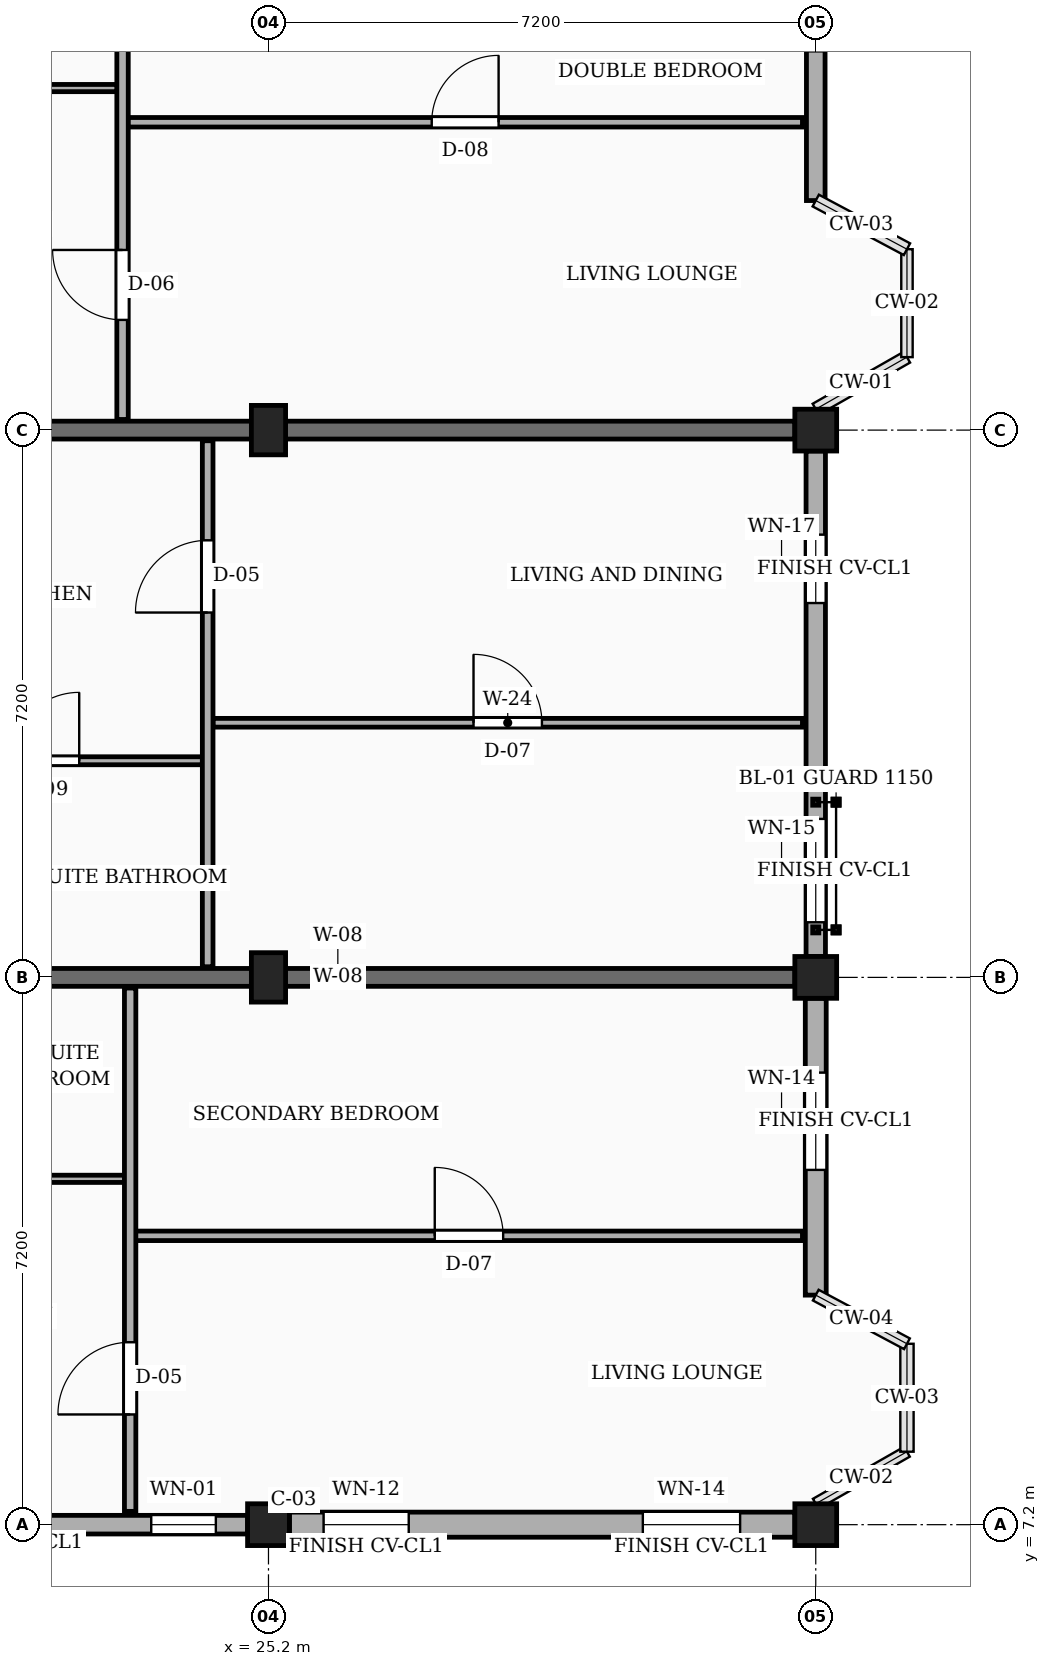
"""IFC4 building model, lengths in metres.
Left out: names, types, materials, properties, quantities, classifications, styles, units other than length and angle.
Written with IfcOpenShell. Run it as: python <this file> out.ifc"""

import sys

from ifc_helpers import new_model, si_unit, direction, frame, frame_2d, origin, origin_2d, place, context, subcontext, project, spatial, rectangle, extrude, element, fill, save


model = new_model("IFC4")
c1 = context("Model", 3, precision=1e-05, world=origin(), true_north=direction((0.0, 1.0)))
c2 = subcontext(c1, "Body", "Model", "MODEL_VIEW")
j1 = project(units=[si_unit("LENGTHUNIT", "METRE"), si_unit("PLANEANGLEUNIT", "RADIAN")], contexts=[c1])
p1 = place(None, origin())
s1 = spatial("IfcSite", under=j1, at=p1, CompositionType="ELEMENT")
p2 = place(p1, origin())
s2 = spatial("IfcBuilding", under=s1, at=p2, CompositionType="ELEMENT")
p3 = place(p2, frame((0.0, 0.0, 13.95)))
s3 = spatial("IfcBuildingStorey", under=s2, at=p3, CompositionType="ELEMENT", Elevation=13.95)
p4 = place(p3, frame((25.2, 7.2, 0.0), z_axis=(0.0, 0.0, 1.0), x_axis=(1.0, 0.0, 0.0)))
e1 = element("IfcColumn", 1, at=p4, inside=s3, PredefinedType="COLUMN", context=c2, shape_type="SweptSolid", body=[
    extrude(rectangle(XDim=0.55, YDim=0.55, at=origin_2d()), origin(), (0.0, 0.0, 1.0), 3.15),
])
for number, where, z_axis, x_axis in (
    (2, (25.2, 14.4, 0.0), (0.0, 0.0, 1.0), (1.0, 0.0, 0.0)),
    (3, (25.2, 21.6, 0.0), (0.0, 0.0, 1.0), (1.0, 0.0, 0.0)),
):
    element("IfcColumn", number, at=place(p3, frame(where, z_axis=z_axis, x_axis=x_axis)), inside=s3, PredefinedType="COLUMN", context=c2, shape_type="SweptSolid", body=[
        extrude(rectangle(XDim=0.45, YDim=0.65, at=origin_2d()), origin(), (0.0, 0.0, 1.0), 3.15),
    ])
for number, where, z_axis, x_axis in (
    (4, (32.4, 7.2, 0.0), (0.0, 0.0, 1.0), (1.0, 0.0, 0.0)),
    (5, (32.4, 14.4, 0.0), (0.0, 0.0, 1.0), (1.0, 0.0, 0.0)),
    (6, (32.4, 21.6, 0.0), (0.0, 0.0, 1.0), (1.0, 0.0, 0.0)),
):
    element("IfcColumn", number, at=place(p3, frame(where, z_axis=z_axis, x_axis=x_axis)), inside=s3, PredefinedType="COLUMN", context=c2, shape_type="SweptSolid", body=[
        extrude(rectangle(XDim=0.55, YDim=0.55, at=origin_2d()), origin(), (0.0, 0.0, 1.0), 3.15),
    ])
for number, where, z_axis, x_axis in (
    (7, (20.1, 14.4, 0.0), (0.0, 0.0, 1.0), (1.0, 0.0, 0.0)),
    (8, (20.1, 21.6, 0.0), (0.0, 0.0, 1.0), (1.0, 0.0, 0.0)),
):
    element("IfcWall", number, at=place(p3, frame(where, z_axis=z_axis, x_axis=x_axis)), inside=s3, PredefinedType="SOLIDWALL", context=c2, shape_type="SweptSolid", body=[
        extrude(rectangle(XDim=12.025, YDim=0.235, at=frame_2d((6.012, 0.0))), origin(), (0.0, 0.0, 1.0), 2.17),
    ])
p5 = place(p3, frame((18.275, 7.2, 0.0), z_axis=(0.0, 0.0, 1.0), x_axis=(1.0, 0.0, 0.0)))
e9 = element("IfcWall", 9, at=p5, inside=s3, PredefinedType="SOLIDWALL", context=c2, shape_type="SweptSolid", body=[
    extrude(rectangle(XDim=6.65, YDim=0.245, at=frame_2d((3.325, 0.0))), origin(), (0.0, 0.0, 1.0), 2.44),
])
p6 = place(p5, frame((0.542, 0.0, 0.78)))
e10 = element("IfcOpeningElement", 10, at=p6, cuts=e9, PredefinedType="OPENING", context=c2, shape_type="SweptSolid", body=[
    extrude(rectangle(XDim=0.88, YDim=1.26, at=frame_2d((0.44, 0.63))), frame((0.0, 0.133, 0.0), z_axis=(0.0, -1.0, 0.0), x_axis=(1.0, 0.0, 0.0)), (0.0, 0.0, 1.0), 0.265),
])
p7 = place(p5, frame((2.945, 0.0, 0.78)))
e11 = element("IfcOpeningElement", 11, at=p7, cuts=e9, PredefinedType="OPENING", context=c2, shape_type="SweptSolid", body=[
    extrude(rectangle(XDim=1.04, YDim=1.26, at=frame_2d((0.52, 0.63))), frame((0.0, 0.133, 0.0), z_axis=(0.0, -1.0, 0.0), x_axis=(1.0, 0.0, 0.0)), (0.0, 0.0, 1.0), 0.265),
])
p8 = place(p5, frame((5.383, 0.0, 0.78)))
e12 = element("IfcOpeningElement", 12, at=p8, cuts=e9, PredefinedType="OPENING", context=c2, shape_type="SweptSolid", body=[
    extrude(rectangle(XDim=0.85, YDim=1.15, at=frame_2d((0.425, 0.575))), frame((0.0, 0.133, 0.0), z_axis=(0.0, -1.0, 0.0), x_axis=(1.0, 0.0, 0.0)), (0.0, 0.0, 1.0), 0.265),
])
p9 = place(p3, frame((25.475, 7.2, 0.0), z_axis=(0.0, 0.0, 1.0), x_axis=(1.0, 0.0, 0.0)))
e13 = element("IfcWall", 13, at=p9, inside=s3, PredefinedType="SOLIDWALL", context=c2, shape_type="SweptSolid", body=[
    extrude(rectangle(XDim=6.65, YDim=0.33, at=frame_2d((3.325, 0.0))), origin(), (0.0, 0.0, 1.0), 2.44),
])
p10 = place(p9, frame((0.45, 0.0, 0.78)))
e14 = element("IfcOpeningElement", 14, at=p10, cuts=e13, PredefinedType="OPENING", context=c2, shape_type="SweptSolid", body=[
    extrude(rectangle(XDim=1.12, YDim=1.26, at=frame_2d((0.56, 0.63))), frame((0.0, 0.175, 0.0), z_axis=(0.0, -1.0, 0.0), x_axis=(1.0, 0.0, 0.0)), (0.0, 0.0, 1.0), 0.35),
])
p11 = place(p9, frame((4.65, 0.0, 0.78)))
e15 = element("IfcOpeningElement", 15, at=p11, cuts=e13, PredefinedType="OPENING", context=c2, shape_type="SweptSolid", body=[
    extrude(rectangle(XDim=1.28, YDim=1.26, at=frame_2d((0.64, 0.63))), frame((0.0, 0.175, 0.0), z_axis=(0.0, -1.0, 0.0), x_axis=(1.0, 0.0, 0.0)), (0.0, 0.0, 1.0), 0.35),
])
p12 = place(p3, frame((32.4, 10.22, 0.0), z_axis=(0.0, 0.0, 1.0), x_axis=(0.0, 1.0, 0.0)))
e16 = element("IfcWall", 16, at=p12, inside=s3, PredefinedType="SOLIDWALL", context=c2, shape_type="SweptSolid", body=[
    extrude(rectangle(XDim=3.905, YDim=0.275, at=frame_2d((1.953, 0.0))), origin(), (0.0, 0.0, 1.0), 2.44),
])
p13 = place(p12, frame((1.647, 0.0, 0.78)))
e17 = element("IfcOpeningElement", 17, at=p13, cuts=e16, PredefinedType="OPENING", context=c2, shape_type="SweptSolid", body=[
    extrude(rectangle(XDim=1.28, YDim=1.26, at=frame_2d((0.64, 0.63))), frame((0.0, 0.147, 0.0), z_axis=(0.0, -1.0, 0.0), x_axis=(1.0, 0.0, 0.0)), (0.0, 0.0, 1.0), 0.295),
])
p14 = place(p3, frame((32.4, 14.675, 0.0), z_axis=(0.0, 0.0, 1.0), x_axis=(0.0, 1.0, 0.0)))
e18 = element("IfcWall", 18, at=p14, inside=s3, PredefinedType="SOLIDWALL", context=c2, shape_type="SweptSolid", body=[
    extrude(rectangle(XDim=6.65, YDim=0.255, at=frame_2d((3.325, 0.0))), origin(), (0.0, 0.0, 1.0), 2.44),
])
p15 = place(p14, frame((0.45, 0.0, 0.78)))
e19 = element("IfcOpeningElement", 19, at=p15, cuts=e18, PredefinedType="OPENING", context=c2, shape_type="SweptSolid", body=[
    extrude(rectangle(XDim=1.36, YDim=1.26, at=frame_2d((0.68, 0.63))), frame((0.0, 0.137, 0.0), z_axis=(0.0, -1.0, 0.0), x_axis=(1.0, 0.0, 0.0)), (0.0, 0.0, 1.0), 0.275),
])
p16 = place(p14, frame((4.65, 0.0, 0.78)))
e20 = element("IfcOpeningElement", 20, at=p16, cuts=e18, PredefinedType="OPENING", context=c2, shape_type="SweptSolid", body=[
    extrude(rectangle(XDim=0.9, YDim=1.36, at=frame_2d((0.45, 0.68))), frame((0.0, 0.137, 0.0), z_axis=(0.0, -1.0, 0.0), x_axis=(1.0, 0.0, 0.0)), (0.0, 0.0, 1.0), 0.275),
])
p17 = place(p3, frame((32.4, 24.62, 0.0), z_axis=(0.0, 0.0, 1.0), x_axis=(0.0, 1.0, 0.0)))
e21 = element("IfcWall", 21, at=p17, inside=s3, PredefinedType="SOLIDWALL", context=c2, shape_type="SweptSolid", body=[
    extrude(rectangle(XDim=3.905, YDim=0.245, at=frame_2d((1.952, 0.0))), origin(), (0.0, 0.0, 1.0), 2.44),
])
p18 = place(p17, frame((1.962, 0.0, 0.78)))
e22 = element("IfcOpeningElement", 22, at=p18, cuts=e21, PredefinedType="OPENING", context=c2, shape_type="SweptSolid", body=[
    extrude(rectangle(XDim=0.9, YDim=1.36, at=frame_2d((0.45, 0.68))), frame((0.0, 0.133, 0.0), z_axis=(0.0, -1.0, 0.0), x_axis=(1.0, 0.0, 0.0)), (0.0, 0.0, 1.0), 0.265),
])
p19 = place(p3, frame((23.45, 11.0, 0.0), z_axis=(0.0, 0.0, 1.0), x_axis=(1.0, 0.0, 0.0)))
e23 = element("IfcWall", 23, at=p19, inside=s3, PredefinedType="PARTITIONING", context=c2, shape_type="SweptSolid", body=[
    extrude(rectangle(XDim=8.775, YDim=0.125, at=frame_2d((4.388, 0.0))), origin(), (0.0, 0.0, 1.0), 2.305),
])
p20 = place(p19, frame((3.938, 0.0, 0.0)))
e24 = element("IfcOpeningElement", 24, at=p20, cuts=e23, PredefinedType="OPENING", context=c2, shape_type="SweptSolid", body=[
    extrude(rectangle(XDim=0.9, YDim=2.1, at=frame_2d((0.45, 1.05))), frame((0.0, 0.073, 0.0), z_axis=(0.0, -1.0, 0.0), x_axis=(1.0, 0.0, 0.0)), (0.0, 0.0, 1.0), 0.145),
])
p21 = place(p3, frame((20.19, 11.75, 0.0), z_axis=(0.0, 0.0, 1.0), x_axis=(1.0, 0.0, 0.0)))
e25 = element("IfcWall", 25, at=p21, inside=s3, PredefinedType="PARTITIONING", context=c2, shape_type="SweptSolid", body=[
    extrude(rectangle(XDim=3.12, YDim=0.095, at=frame_2d((1.56, 0.0))), origin(), (0.0, 0.0, 1.0), 2.305),
])
p22 = place(p21, frame((1.11, 0.0, 0.0)))
e26 = element("IfcOpeningElement", 26, at=p22, cuts=e25, PredefinedType="OPENING", context=c2, shape_type="SweptSolid", body=[
    extrude(rectangle(XDim=0.9, YDim=2.05, at=frame_2d((0.45, 1.025))), frame((0.0, 0.058, 0.0), z_axis=(0.0, -1.0, 0.0), x_axis=(1.0, 0.0, 0.0)), (0.0, 0.0, 1.0), 0.115),
])
p23 = place(p3, frame((23.38, 7.375, 0.0), z_axis=(0.0, 0.0, 1.0), x_axis=(0.0, 1.0, 0.0)))
e27 = element("IfcWall", 27, at=p23, inside=s3, PredefinedType="PARTITIONING", context=c2, shape_type="SweptSolid", body=[
    extrude(rectangle(XDim=6.885, YDim=0.15, at=frame_2d((3.442, 0.0))), origin(), (0.0, 0.0, 1.0), 2.305),
])
p24 = place(p23, frame((1.275, 0.0, 0.0)))
e28 = element("IfcOpeningElement", 28, at=p24, cuts=e27, PredefinedType="OPENING", context=c2, shape_type="SweptSolid", body=[
    extrude(rectangle(XDim=0.95, YDim=2.1, at=frame_2d((0.475, 1.05))), frame((0.0, 0.085, 0.0), z_axis=(0.0, -1.0, 0.0), x_axis=(1.0, 0.0, 0.0)), (0.0, 0.0, 1.0), 0.17),
])
p25 = place(p3, frame((24.47, 17.75, 0.0), z_axis=(0.0, 0.0, 1.0), x_axis=(1.0, 0.0, 0.0)))
e29 = element("IfcWall", 29, at=p25, inside=s3, PredefinedType="PARTITIONING", context=c2, shape_type="SweptSolid", body=[
    extrude(rectangle(XDim=7.755, YDim=0.115, at=frame_2d((3.877, 0.0))), origin(), (0.0, 0.0, 1.0), 2.305),
])
p26 = place(p25, frame((3.427, 0.0, 0.0)))
e30 = element("IfcOpeningElement", 30, at=p26, cuts=e29, PredefinedType="OPENING", context=c2, shape_type="SweptSolid", body=[
    extrude(rectangle(XDim=0.9, YDim=2.1, at=frame_2d((0.45, 1.05))), frame((0.0, 0.067, 0.0), z_axis=(0.0, -1.0, 0.0), x_axis=(1.0, 0.0, 0.0)), (0.0, 0.0, 1.0), 0.135),
])
p27 = place(p3, frame((20.19, 17.25, 0.0), z_axis=(0.0, 0.0, 1.0), x_axis=(1.0, 0.0, 0.0)))
e31 = element("IfcWall", 31, at=p27, inside=s3, PredefinedType="PARTITIONING", context=c2, shape_type="SweptSolid", body=[
    extrude(rectangle(XDim=4.14, YDim=0.105, at=frame_2d((2.07, 0.0))), origin(), (0.0, 0.0, 1.0), 2.305),
])
p28 = place(p27, frame((1.62, 0.0, 0.0)))
e32 = element("IfcOpeningElement", 32, at=p28, cuts=e31, PredefinedType="OPENING", context=c2, shape_type="SweptSolid", body=[
    extrude(rectangle(XDim=0.9, YDim=2.05, at=frame_2d((0.45, 1.025))), frame((0.0, 0.062, 0.0), z_axis=(0.0, -1.0, 0.0), x_axis=(1.0, 0.0, 0.0)), (0.0, 0.0, 1.0), 0.125),
])
p29 = place(p3, frame((24.4, 14.54, 0.0), z_axis=(0.0, 0.0, 1.0), x_axis=(0.0, 1.0, 0.0)))
e33 = element("IfcWall", 33, at=p29, inside=s3, PredefinedType="PARTITIONING", context=c2, shape_type="SweptSolid", body=[
    extrude(rectangle(XDim=6.92, YDim=0.14, at=frame_2d((3.46, 0.0))), origin(), (0.0, 0.0, 1.0), 2.305),
])
p30 = place(p29, frame((4.66, 0.0, 0.0)))
e34 = element("IfcOpeningElement", 34, at=p30, cuts=e33, PredefinedType="OPENING", context=c2, shape_type="SweptSolid", body=[
    extrude(rectangle(XDim=0.95, YDim=2.1, at=frame_2d((0.475, 1.05))), frame((0.0, 0.08, 0.0), z_axis=(0.0, -1.0, 0.0), x_axis=(1.0, 0.0, 0.0)), (0.0, 0.0, 1.0), 0.16),
])
p31 = place(p3, frame((23.35, 25.65, 0.0), z_axis=(0.0, 0.0, 1.0), x_axis=(1.0, 0.0, 0.0)))
e35 = element("IfcWall", 35, at=p31, inside=s3, PredefinedType="PARTITIONING", context=c2, shape_type="SweptSolid", body=[
    extrude(rectangle(XDim=8.875, YDim=0.125, at=frame_2d((4.438, 0.0))), origin(), (0.0, 0.0, 1.0), 2.305),
])
p32 = place(p31, frame((3.998, 0.0, 0.0)))
e36 = element("IfcOpeningElement", 36, at=p32, cuts=e35, PredefinedType="OPENING", context=c2, shape_type="SweptSolid", body=[
    extrude(rectangle(XDim=0.88, YDim=2.08, at=frame_2d((0.44, 1.04))), frame((0.0, 0.073, 0.0), z_axis=(0.0, -1.0, 0.0), x_axis=(1.0, 0.0, 0.0)), (0.0, 0.0, 1.0), 0.145),
])
p33 = place(p3, frame((20.19, 26.1, 0.0), z_axis=(0.0, 0.0, 1.0), x_axis=(1.0, 0.0, 0.0)))
e37 = element("IfcWall", 37, at=p33, inside=s3, PredefinedType="PARTITIONING", context=c2, shape_type="SweptSolid", body=[
    extrude(rectangle(XDim=3.02, YDim=0.095, at=frame_2d((1.51, 0.0))), origin(), (0.0, 0.0, 1.0), 2.305),
])
p34 = place(p33, frame((1.075, 0.0, 0.0)))
e38 = element("IfcOpeningElement", 38, at=p34, cuts=e37, PredefinedType="OPENING", context=c2, shape_type="SweptSolid", body=[
    extrude(rectangle(XDim=0.87, YDim=2.05, at=frame_2d((0.435, 1.025))), frame((0.0, 0.058, 0.0), z_axis=(0.0, -1.0, 0.0), x_axis=(1.0, 0.0, 0.0)), (0.0, 0.0, 1.0), 0.115),
])
p35 = place(p3, frame((23.28, 21.74, 0.0), z_axis=(0.0, 0.0, 1.0), x_axis=(0.0, 1.0, 0.0)))
e39 = element("IfcWall", 39, at=p35, inside=s3, PredefinedType="PARTITIONING", context=c2, shape_type="SweptSolid", body=[
    extrude(rectangle(XDim=6.92, YDim=0.15, at=frame_2d((3.46, 0.0))), origin(), (0.0, 0.0, 1.0), 2.305),
])
p36 = place(p35, frame((1.31, 0.0, 0.0)))
e40 = element("IfcOpeningElement", 40, at=p36, cuts=e39, PredefinedType="OPENING", context=c2, shape_type="SweptSolid", body=[
    extrude(rectangle(XDim=0.92, YDim=2.1, at=frame_2d((0.46, 1.05))), frame((0.0, 0.085, 0.0), z_axis=(0.0, -1.0, 0.0), x_axis=(1.0, 0.0, 0.0)), (0.0, 0.0, 1.0), 0.17),
])
p37 = place(p8, origin())
e41 = element("IfcWindow", 41, at=p37, inside=s3, PartitioningType="SINGLE_PANEL", PredefinedType="WINDOW", context=c2, shape_type="SweptSolid", body=[
    extrude(rectangle(XDim=0.85, YDim=1.15, at=frame_2d((0.425, 0.575))), frame((0.0, 0.03, 0.0), z_axis=(0.0, -1.0, 0.0), x_axis=(1.0, 0.0, 0.0)), (0.0, 0.0, 1.0), 0.06),
])
fill(e12, e41)
p38 = place(p10, origin())
e42 = element("IfcWindow", 42, at=p38, inside=s3, PartitioningType="SINGLE_PANEL", PredefinedType="WINDOW", context=c2, shape_type="SweptSolid", body=[
    extrude(rectangle(XDim=1.12, YDim=1.26, at=frame_2d((0.56, 0.63))), frame((0.0, 0.03, 0.0), z_axis=(0.0, -1.0, 0.0), x_axis=(1.0, 0.0, 0.0)), (0.0, 0.0, 1.0), 0.06),
])
fill(e14, e42)
p39 = place(p11, origin())
e43 = element("IfcWindow", 43, at=p39, inside=s3, PartitioningType="SINGLE_PANEL", PredefinedType="WINDOW", context=c2, shape_type="SweptSolid", body=[
    extrude(rectangle(XDim=1.28, YDim=1.26, at=frame_2d((0.64, 0.63))), frame((0.0, 0.03, 0.0), z_axis=(0.0, -1.0, 0.0), x_axis=(1.0, 0.0, 0.0)), (0.0, 0.0, 1.0), 0.06),
])
fill(e15, e43)
p40 = place(p13, origin())
e44 = element("IfcWindow", 44, at=p40, inside=s3, PartitioningType="SINGLE_PANEL", PredefinedType="WINDOW", context=c2, shape_type="SweptSolid", body=[
    extrude(rectangle(XDim=1.28, YDim=1.26, at=frame_2d((0.64, 0.63))), frame((0.0, 0.03, 0.0), z_axis=(0.0, -1.0, 0.0), x_axis=(1.0, 0.0, 0.0)), (0.0, 0.0, 1.0), 0.06),
])
fill(e17, e44)
p41 = place(p15, origin())
e45 = element("IfcWindow", 45, at=p41, inside=s3, PartitioningType="SINGLE_PANEL", PredefinedType="WINDOW", context=c2, shape_type="SweptSolid", body=[
    extrude(rectangle(XDim=1.36, YDim=1.26, at=frame_2d((0.68, 0.63))), frame((0.0, 0.03, 0.0), z_axis=(0.0, -1.0, 0.0), x_axis=(1.0, 0.0, 0.0)), (0.0, 0.0, 1.0), 0.06),
])
fill(e19, e45)
p42 = place(p16, origin())
e46 = element("IfcWindow", 46, at=p42, inside=s3, PartitioningType="SINGLE_PANEL", PredefinedType="WINDOW", context=c2, shape_type="SweptSolid", body=[
    extrude(rectangle(XDim=0.9, YDim=1.36, at=frame_2d((0.45, 0.68))), frame((0.0, 0.03, 0.0), z_axis=(0.0, -1.0, 0.0), x_axis=(1.0, 0.0, 0.0)), (0.0, 0.0, 1.0), 0.06),
])
fill(e20, e46)
p43 = place(p20, origin())
e47 = element("IfcDoor", 47, at=p43, inside=s3, OperationType="SINGLE_SWING_LEFT", PredefinedType="DOOR", context=c2, shape_type="SweptSolid", body=[
    extrude(rectangle(XDim=0.9, YDim=2.1, at=frame_2d((0.45, 1.05))), frame((0.0, 0.025, 0.0), z_axis=(0.0, -1.0, 0.0), x_axis=(1.0, 0.0, 0.0)), (0.0, 0.0, 1.0), 0.05),
])
fill(e24, e47)
p44 = place(p24, origin())
e48 = element("IfcDoor", 48, at=p44, inside=s3, OperationType="SINGLE_SWING_LEFT", PredefinedType="DOOR", context=c2, shape_type="SweptSolid", body=[
    extrude(rectangle(XDim=0.95, YDim=2.1, at=frame_2d((0.475, 1.05))), frame((0.0, 0.025, 0.0), z_axis=(0.0, -1.0, 0.0), x_axis=(1.0, 0.0, 0.0)), (0.0, 0.0, 1.0), 0.05),
])
fill(e28, e48)
p45 = place(p26, origin())
e49 = element("IfcDoor", 49, at=p45, inside=s3, OperationType="SINGLE_SWING_LEFT", PredefinedType="DOOR", context=c2, shape_type="SweptSolid", body=[
    extrude(rectangle(XDim=0.9, YDim=2.1, at=frame_2d((0.45, 1.05))), frame((0.0, 0.025, 0.0), z_axis=(0.0, -1.0, 0.0), x_axis=(1.0, 0.0, 0.0)), (0.0, 0.0, 1.0), 0.05),
])
fill(e30, e49)
p46 = place(p28, origin())
e50 = element("IfcDoor", 50, at=p46, inside=s3, OperationType="SINGLE_SWING_RIGHT", PredefinedType="DOOR", context=c2, shape_type="SweptSolid", body=[
    extrude(rectangle(XDim=0.9, YDim=2.05, at=frame_2d((0.45, 1.025))), frame((0.0, 0.025, 0.0), z_axis=(0.0, -1.0, 0.0), x_axis=(1.0, 0.0, 0.0)), (0.0, 0.0, 1.0), 0.05),
])
fill(e32, e50)
p47 = place(p30, origin())
e51 = element("IfcDoor", 51, at=p47, inside=s3, OperationType="SINGLE_SWING_LEFT", PredefinedType="DOOR", context=c2, shape_type="SweptSolid", body=[
    extrude(rectangle(XDim=0.95, YDim=2.1, at=frame_2d((0.475, 1.05))), frame((0.0, 0.025, 0.0), z_axis=(0.0, -1.0, 0.0), x_axis=(1.0, 0.0, 0.0)), (0.0, 0.0, 1.0), 0.05),
])
fill(e34, e51)
p48 = place(p32, origin())
e52 = element("IfcDoor", 52, at=p48, inside=s3, OperationType="SINGLE_SWING_RIGHT", PredefinedType="DOOR", context=c2, shape_type="SweptSolid", body=[
    extrude(rectangle(XDim=0.88, YDim=2.08, at=frame_2d((0.44, 1.04))), frame((0.0, 0.025, 0.0), z_axis=(0.0, -1.0, 0.0), x_axis=(1.0, 0.0, 0.0)), (0.0, 0.0, 1.0), 0.05),
])
fill(e36, e52)
p49 = place(p36, origin())
e53 = element("IfcDoor", 53, at=p49, inside=s3, OperationType="SINGLE_SWING_RIGHT", PredefinedType="DOOR", context=c2, shape_type="SweptSolid", body=[
    extrude(rectangle(XDim=0.92, YDim=2.1, at=frame_2d((0.46, 1.05))), frame((0.0, 0.025, 0.0), z_axis=(0.0, -1.0, 0.0), x_axis=(1.0, 0.0, 0.0)), (0.0, 0.0, 1.0), 0.05),
])
fill(e40, e53)
save(model, sys.argv[1])
